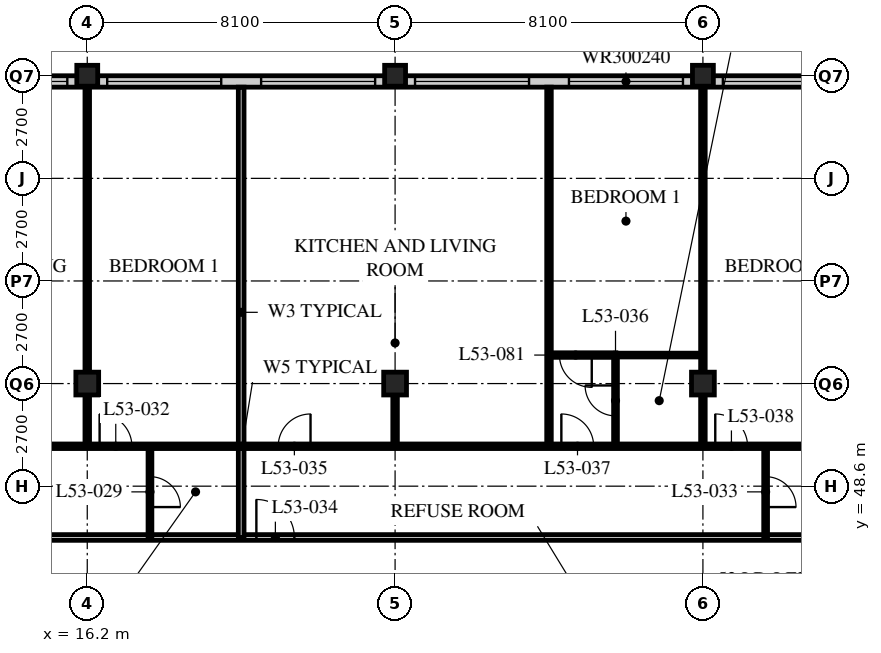
"""IFC4 building model, lengths in metres.
Left out: names, types, materials, properties, quantities, classifications, styles, units other than length and angle.
Written with IfcOpenShell. Run it as: python <this file> out.ifc"""

import sys

from ifc_helpers import new_model, si_unit, direction, frame, frame_2d, origin, origin_2d, place, context, subcontext, project, spatial, rectangle, hollow_rectangle, extrude, element, fill, save


model = new_model("IFC4")
c1 = context("Model", 3, precision=1e-05, world=origin(), true_north=direction((0.0, 1.0)))
c2 = subcontext(c1, "Body", "Model", "MODEL_VIEW")
j1 = project(units=[si_unit("LENGTHUNIT", "METRE"), si_unit("PLANEANGLEUNIT", "RADIAN")], contexts=[c1])
p1 = place(None, origin())
s1 = spatial("IfcSite", under=j1, at=p1, CompositionType="ELEMENT")
p2 = place(p1, origin())
s2 = spatial("IfcBuilding", under=s1, at=p2, CompositionType="ELEMENT")
p3 = place(p2, frame((0.0, 0.0, 206.4)))
s3 = spatial("IfcBuildingStorey", under=s2, at=p3, CompositionType="ELEMENT", Elevation=206.4)
p4 = place(p3, frame((16.2, 51.3, 0.0), z_axis=(0.0, 0.0, 1.0), x_axis=(1.0, 0.0, 0.0)))
e1 = element("IfcColumn", 1, at=p4, inside=s3, PredefinedType="COLUMN", context=c2, shape_type="SweptSolid", body=[
    extrude(hollow_rectangle(XDim=0.6, YDim=0.6, WallThickness=0.05, at=origin_2d()), origin(), (0.0, 0.0, 1.0), 3.6),
])
p5 = place(p3, frame((16.2, 59.4, 0.0), z_axis=(0.0, 0.0, 1.0), x_axis=(1.0, 0.0, 0.0)))
e2 = element("IfcColumn", 2, at=p5, inside=s3, PredefinedType="COLUMN", context=c2, shape_type="SweptSolid", body=[
    extrude(hollow_rectangle(XDim=0.55, YDim=0.55, WallThickness=0.045, at=origin_2d()), origin(), (0.0, 0.0, 1.0), 3.6),
])
p6 = place(p3, frame((24.3, 51.3, 0.0), z_axis=(0.0, 0.0, 1.0), x_axis=(1.0, 0.0, 0.0)))
e3 = element("IfcColumn", 3, at=p6, inside=s3, PredefinedType="COLUMN", context=c2, shape_type="SweptSolid", body=[
    extrude(hollow_rectangle(XDim=0.6, YDim=0.6, WallThickness=0.05, at=origin_2d()), origin(), (0.0, 0.0, 1.0), 3.6),
])
p7 = place(p3, frame((24.3, 59.4, 0.0), z_axis=(0.0, 0.0, 1.0), x_axis=(1.0, 0.0, 0.0)))
e4 = element("IfcColumn", 4, at=p7, inside=s3, PredefinedType="COLUMN", context=c2, shape_type="SweptSolid", body=[
    extrude(hollow_rectangle(XDim=0.55, YDim=0.55, WallThickness=0.045, at=origin_2d()), origin(), (0.0, 0.0, 1.0), 3.6),
])
p8 = place(p3, frame((32.4, 51.3, 0.0), z_axis=(0.0, 0.0, 1.0), x_axis=(1.0, 0.0, 0.0)))
e5 = element("IfcColumn", 5, at=p8, inside=s3, PredefinedType="COLUMN", context=c2, shape_type="SweptSolid", body=[
    extrude(hollow_rectangle(XDim=0.6, YDim=0.6, WallThickness=0.05, at=origin_2d()), origin(), (0.0, 0.0, 1.0), 3.6),
])
p9 = place(p3, frame((32.4, 59.4, 0.0), z_axis=(0.0, 0.0, 1.0), x_axis=(1.0, 0.0, 0.0)))
e6 = element("IfcColumn", 6, at=p9, inside=s3, PredefinedType="COLUMN", context=c2, shape_type="SweptSolid", body=[
    extrude(hollow_rectangle(XDim=0.55, YDim=0.55, WallThickness=0.045, at=origin_2d()), origin(), (0.0, 0.0, 1.0), 3.6),
])
p10 = place(p3, frame((48.3, 59.25, 0.0), z_axis=(0.0, 0.0, 1.0), x_axis=(-1.0, 0.0, 0.0)))
e7 = element("IfcWall", 7, at=p10, inside=s3, PredefinedType="SOLIDWALL", context=c2, shape_type="SweptSolid", body=[
    extrude(rectangle(XDim=40.2, YDim=0.3, at=frame_2d((20.1, 0.0))), origin(), (0.0, 0.0, 1.0), 3.39),
])
p11 = place(p10, frame((0.225, 0.0, 0.6)))
e8 = element("IfcOpeningElement", 8, at=p11, cuts=e7, PredefinedType="OPENING", context=c2, shape_type="SweptSolid", body=[
    extrude(rectangle(XDim=3.0, YDim=2.4, at=frame_2d((1.5, 1.2))), frame((0.0, 0.16, 0.0), z_axis=(0.0, -1.0, 0.0), x_axis=(1.0, 0.0, 0.0)), (0.0, 0.0, 1.0), 0.32),
])
p12 = place(p10, frame((4.275, 0.0, 0.6)))
e9 = element("IfcOpeningElement", 9, at=p12, cuts=e7, PredefinedType="OPENING", context=c2, shape_type="SweptSolid", body=[
    extrude(rectangle(XDim=3.0, YDim=2.4, at=frame_2d((1.5, 1.2))), frame((0.0, 0.16, 0.0), z_axis=(0.0, -1.0, 0.0), x_axis=(1.0, 0.0, 0.0)), (0.0, 0.0, 1.0), 0.32),
])
p13 = place(p10, frame((8.325, 0.0, 0.6)))
e10 = element("IfcOpeningElement", 10, at=p13, cuts=e7, PredefinedType="OPENING", context=c2, shape_type="SweptSolid", body=[
    extrude(rectangle(XDim=3.0, YDim=2.4, at=frame_2d((1.5, 1.2))), frame((0.0, 0.16, 0.0), z_axis=(0.0, -1.0, 0.0), x_axis=(1.0, 0.0, 0.0)), (0.0, 0.0, 1.0), 0.32),
])
p14 = place(p10, frame((12.375, 0.0, 0.6)))
e11 = element("IfcOpeningElement", 11, at=p14, cuts=e7, PredefinedType="OPENING", context=c2, shape_type="SweptSolid", body=[
    extrude(rectangle(XDim=3.0, YDim=2.4, at=frame_2d((1.5, 1.2))), frame((0.0, 0.16, 0.0), z_axis=(0.0, -1.0, 0.0), x_axis=(1.0, 0.0, 0.0)), (0.0, 0.0, 1.0), 0.32),
])
p15 = place(p10, frame((16.425, 0.0, 0.6)))
e12 = element("IfcOpeningElement", 12, at=p15, cuts=e7, PredefinedType="OPENING", context=c2, shape_type="SweptSolid", body=[
    extrude(rectangle(XDim=3.0, YDim=2.4, at=frame_2d((1.5, 1.2))), frame((0.0, 0.16, 0.0), z_axis=(0.0, -1.0, 0.0), x_axis=(1.0, 0.0, 0.0)), (0.0, 0.0, 1.0), 0.32),
])
p16 = place(p10, frame((20.475, 0.0, 0.6)))
e13 = element("IfcOpeningElement", 13, at=p16, cuts=e7, PredefinedType="OPENING", context=c2, shape_type="SweptSolid", body=[
    extrude(rectangle(XDim=3.0, YDim=2.4, at=frame_2d((1.5, 1.2))), frame((0.0, 0.16, 0.0), z_axis=(0.0, -1.0, 0.0), x_axis=(1.0, 0.0, 0.0)), (0.0, 0.0, 1.0), 0.32),
])
p17 = place(p10, frame((24.525, 0.0, 0.6)))
e14 = element("IfcOpeningElement", 14, at=p17, cuts=e7, PredefinedType="OPENING", context=c2, shape_type="SweptSolid", body=[
    extrude(rectangle(XDim=3.0, YDim=2.4, at=frame_2d((1.5, 1.2))), frame((0.0, 0.16, 0.0), z_axis=(0.0, -1.0, 0.0), x_axis=(1.0, 0.0, 0.0)), (0.0, 0.0, 1.0), 0.32),
])
p18 = place(p10, frame((28.575, 0.0, 0.6)))
e15 = element("IfcOpeningElement", 15, at=p18, cuts=e7, PredefinedType="OPENING", context=c2, shape_type="SweptSolid", body=[
    extrude(rectangle(XDim=3.0, YDim=2.4, at=frame_2d((1.5, 1.2))), frame((0.0, 0.16, 0.0), z_axis=(0.0, -1.0, 0.0), x_axis=(1.0, 0.0, 0.0)), (0.0, 0.0, 1.0), 0.32),
])
p19 = place(p10, frame((32.625, 0.0, 0.6)))
e16 = element("IfcOpeningElement", 16, at=p19, cuts=e7, PredefinedType="OPENING", context=c2, shape_type="SweptSolid", body=[
    extrude(rectangle(XDim=3.0, YDim=2.4, at=frame_2d((1.5, 1.2))), frame((0.0, 0.16, 0.0), z_axis=(0.0, -1.0, 0.0), x_axis=(1.0, 0.0, 0.0)), (0.0, 0.0, 1.0), 0.32),
])
p20 = place(p10, frame((36.675, 0.0, 0.6)))
e17 = element("IfcOpeningElement", 17, at=p20, cuts=e7, PredefinedType="OPENING", context=c2, shape_type="SweptSolid", body=[
    extrude(rectangle(XDim=3.0, YDim=2.4, at=frame_2d((1.5, 1.2))), frame((0.0, 0.16, 0.0), z_axis=(0.0, -1.0, 0.0), x_axis=(1.0, 0.0, 0.0)), (0.0, 0.0, 1.0), 0.32),
])
p21 = place(p3, frame((8.1, 47.25, 0.0), z_axis=(0.0, 0.0, 1.0), x_axis=(1.0, 0.0, 0.0)))
e18 = element("IfcWall", 18, at=p21, inside=s3, PredefinedType="PARTITIONING", context=c2, shape_type="SweptSolid", body=[
    extrude(rectangle(XDim=36.45, YDim=0.15, at=frame_2d((18.225, 0.0))), origin(), (0.0, 0.0, 1.0), 3.39),
])
p22 = place(p21, frame((4.45, 0.0, 0.0)))
e19 = element("IfcOpeningElement", 19, at=p22, cuts=e18, PredefinedType="OPENING", context=c2, shape_type="SweptSolid", body=[
    extrude(rectangle(XDim=1.0, YDim=2.1, at=frame_2d((0.5, 1.05))), frame((0.0, 0.085, 0.0), z_axis=(0.0, -1.0, 0.0), x_axis=(1.0, 0.0, 0.0)), (0.0, 0.0, 1.0), 0.17),
])
p23 = place(p21, frame((12.55, 0.0, 0.0)))
e20 = element("IfcOpeningElement", 20, at=p23, cuts=e18, PredefinedType="OPENING", context=c2, shape_type="SweptSolid", body=[
    extrude(rectangle(XDim=1.0, YDim=2.1, at=frame_2d((0.5, 1.05))), frame((0.0, 0.085, 0.0), z_axis=(0.0, -1.0, 0.0), x_axis=(1.0, 0.0, 0.0)), (0.0, 0.0, 1.0), 0.17),
])
p24 = place(p21, frame((30.7, 0.0, 0.0)))
e21 = element("IfcOpeningElement", 21, at=p24, cuts=e18, PredefinedType="OPENING", context=c2, shape_type="SweptSolid", body=[
    extrude(rectangle(XDim=1.0, YDim=2.1, at=frame_2d((0.5, 1.05))), frame((0.0, 0.085, 0.0), z_axis=(0.0, -1.0, 0.0), x_axis=(1.0, 0.0, 0.0)), (0.0, 0.0, 1.0), 0.17),
])
p25 = place(p21, frame((33.925, 0.0, 0.0)))
e22 = element("IfcOpeningElement", 22, at=p25, cuts=e18, PredefinedType="OPENING", context=c2, shape_type="SweptSolid", body=[
    extrude(rectangle(XDim=1.0, YDim=2.1, at=frame_2d((0.5, 1.05))), frame((0.0, 0.085, 0.0), z_axis=(0.0, -1.0, 0.0), x_axis=(1.0, 0.0, 0.0)), (0.0, 0.0, 1.0), 0.17),
])
p26 = place(p21, frame((1.525, 0.0, 0.0)))
e23 = element("IfcOpeningElement", 23, at=p26, cuts=e18, PredefinedType="OPENING", context=c2, shape_type="SweptSolid", body=[
    extrude(rectangle(XDim=1.0, YDim=2.1, at=frame_2d((0.5, 1.05))), frame((0.0, 0.085, 0.0), z_axis=(0.0, -1.0, 0.0), x_axis=(1.0, 0.0, 0.0)), (0.0, 0.0, 1.0), 0.17),
])
p27 = place(p3, frame((17.85, 47.25, 0.0), z_axis=(0.0, 0.0, 1.0), x_axis=(0.0, 1.0, 0.0)))
e24 = element("IfcWall", 24, at=p27, inside=s3, PredefinedType="PARTITIONING", context=c2, shape_type="SweptSolid", body=[
    extrude(rectangle(XDim=2.4, YDim=0.1, at=frame_2d((1.2, 0.0))), origin(), (0.0, 0.0, 1.0), 3.39),
])
p28 = place(p27, frame((0.8, 0.0, 0.0)))
e25 = element("IfcOpeningElement", 25, at=p28, cuts=e24, PredefinedType="OPENING", context=c2, shape_type="SweptSolid", body=[
    extrude(rectangle(XDim=0.8, YDim=2.1, at=frame_2d((0.4, 1.05))), frame((0.0, 0.06, 0.0), z_axis=(0.0, -1.0, 0.0), x_axis=(1.0, 0.0, 0.0)), (0.0, 0.0, 1.0), 0.12),
])
p29 = place(p3, frame((16.2, 49.65, 0.0), z_axis=(0.0, 0.0, 1.0), x_axis=(0.0, 1.0, 0.0)))
e26 = element("IfcWall", 26, at=p29, inside=s3, PredefinedType="PARTITIONING", context=c2, shape_type="SweptSolid", body=[
    extrude(rectangle(XDim=9.45, YDim=0.12, at=frame_2d((4.725, 0.0))), origin(), (0.0, 0.0, 1.0), 2.778),
])
p30 = place(p3, frame((20.25, 47.25, 0.0), z_axis=(0.0, 0.0, 1.0), x_axis=(0.0, 1.0, 0.0)))
e27 = element("IfcWall", 27, at=p30, inside=s3, PredefinedType="PARTITIONING", context=c2, shape_type="SweptSolid", body=[
    extrude(rectangle(XDim=11.85, YDim=0.15, at=frame_2d((5.925, 0.0))), origin(), (0.0, 0.0, 1.0), 3.39),
])
p31 = place(p3, frame((34.05, 47.25, 0.0), z_axis=(0.0, 0.0, 1.0), x_axis=(0.0, 1.0, 0.0)))
e28 = element("IfcWall", 28, at=p31, inside=s3, PredefinedType="PARTITIONING", context=c2, shape_type="SweptSolid", body=[
    extrude(rectangle(XDim=2.4, YDim=0.1, at=frame_2d((1.2, 0.0))), origin(), (0.0, 0.0, 1.0), 3.39),
])
p32 = place(p31, frame((0.8, 0.0, 0.0)))
e29 = element("IfcOpeningElement", 29, at=p32, cuts=e28, PredefinedType="OPENING", context=c2, shape_type="SweptSolid", body=[
    extrude(rectangle(XDim=0.8, YDim=2.1, at=frame_2d((0.4, 1.05))), frame((0.0, 0.06, 0.0), z_axis=(0.0, -1.0, 0.0), x_axis=(1.0, 0.0, 0.0)), (0.0, 0.0, 1.0), 0.12),
])
p33 = place(p3, frame((30.1, 49.65, 0.0), z_axis=(0.0, 0.0, 1.0), x_axis=(0.0, 1.0, 0.0)))
e30 = element("IfcWall", 30, at=p33, inside=s3, PredefinedType="PARTITIONING", context=c2, shape_type="SweptSolid", body=[
    extrude(rectangle(XDim=2.4, YDim=0.1, at=frame_2d((1.2, 0.0))), origin(), (0.0, 0.0, 1.0), 3.39),
])
p34 = place(p33, frame((0.8, 0.0, 0.0)))
e31 = element("IfcOpeningElement", 31, at=p34, cuts=e30, PredefinedType="OPENING", context=c2, shape_type="SweptSolid", body=[
    extrude(rectangle(XDim=0.8, YDim=2.1, at=frame_2d((0.4, 1.05))), frame((0.0, 0.06, 0.0), z_axis=(0.0, -1.0, 0.0), x_axis=(1.0, 0.0, 0.0)), (0.0, 0.0, 1.0), 0.12),
])
p35 = place(p3, frame((30.1, 52.05, 0.0), z_axis=(0.0, 0.0, 1.0), x_axis=(1.0, 0.0, 0.0)))
e32 = element("IfcWall", 32, at=p35, inside=s3, PredefinedType="PARTITIONING", context=c2, shape_type="SweptSolid", body=[
    extrude(rectangle(XDim=2.3, YDim=0.1, at=frame_2d((1.15, 0.0))), origin(), (0.0, 0.0, 1.0), 3.39),
])
p36 = place(p3, frame((28.35, 49.65, 0.0), z_axis=(0.0, 0.0, 1.0), x_axis=(0.0, 1.0, 0.0)))
e33 = element("IfcWall", 33, at=p36, inside=s3, PredefinedType="PARTITIONING", context=c2, shape_type="SweptSolid", body=[
    extrude(rectangle(XDim=9.45, YDim=0.12, at=frame_2d((4.725, 0.0))), origin(), (0.0, 0.0, 1.0), 3.39),
])
p37 = place(p3, frame((32.4, 49.65, 0.0), z_axis=(0.0, 0.0, 1.0), x_axis=(0.0, 1.0, 0.0)))
e34 = element("IfcWall", 34, at=p37, inside=s3, PredefinedType="PARTITIONING", context=c2, shape_type="SweptSolid", body=[
    extrude(rectangle(XDim=9.45, YDim=0.12, at=frame_2d((4.725, 0.0))), origin(), (0.0, 0.0, 1.0), 2.778),
])
p38 = place(p3, frame((4.1, 49.65, 0.0), z_axis=(0.0, 0.0, 1.0), x_axis=(1.0, 0.0, 0.0)))
e35 = element("IfcWall", 35, at=p38, inside=s3, PredefinedType="PARTITIONING", context=c2, shape_type="SweptSolid", body=[
    extrude(rectangle(XDim=32.35, YDim=0.12, at=frame_2d((16.175, 0.0))), origin(), (0.0, 0.0, 1.0), 3.39),
])
p39 = place(p38, frame((9.025, 0.0, 0.0)))
e36 = element("IfcOpeningElement", 36, at=p39, cuts=e35, PredefinedType="OPENING", context=c2, shape_type="SweptSolid", body=[
    extrude(rectangle(XDim=0.85, YDim=2.1, at=frame_2d((0.425, 1.05))), frame((0.0, 0.07, 0.0), z_axis=(0.0, -1.0, 0.0), x_axis=(1.0, 0.0, 0.0)), (0.0, 0.0, 1.0), 0.14),
])
p40 = place(p38, frame((12.425, 0.0, 0.0)))
e37 = element("IfcOpeningElement", 37, at=p40, cuts=e35, PredefinedType="OPENING", context=c2, shape_type="SweptSolid", body=[
    extrude(rectangle(XDim=0.85, YDim=2.1, at=frame_2d((0.425, 1.05))), frame((0.0, 0.07, 0.0), z_axis=(0.0, -1.0, 0.0), x_axis=(1.0, 0.0, 0.0)), (0.0, 0.0, 1.0), 0.14),
])
p41 = place(p38, frame((17.125, 0.0, 0.0)))
e38 = element("IfcOpeningElement", 38, at=p41, cuts=e35, PredefinedType="OPENING", context=c2, shape_type="SweptSolid", body=[
    extrude(rectangle(XDim=0.85, YDim=2.1, at=frame_2d((0.425, 1.05))), frame((0.0, 0.07, 0.0), z_axis=(0.0, -1.0, 0.0), x_axis=(1.0, 0.0, 0.0)), (0.0, 0.0, 1.0), 0.14),
])
p42 = place(p38, frame((24.575, 0.0, 0.0)))
e39 = element("IfcOpeningElement", 39, at=p42, cuts=e35, PredefinedType="OPENING", context=c2, shape_type="SweptSolid", body=[
    extrude(rectangle(XDim=0.85, YDim=2.1, at=frame_2d((0.425, 1.05))), frame((0.0, 0.07, 0.0), z_axis=(0.0, -1.0, 0.0), x_axis=(1.0, 0.0, 0.0)), (0.0, 0.0, 1.0), 0.14),
])
p43 = place(p38, frame((28.625, 0.0, 0.0)))
e40 = element("IfcOpeningElement", 40, at=p43, cuts=e35, PredefinedType="OPENING", context=c2, shape_type="SweptSolid", body=[
    extrude(rectangle(XDim=0.85, YDim=2.1, at=frame_2d((0.425, 1.05))), frame((0.0, 0.07, 0.0), z_axis=(0.0, -1.0, 0.0), x_axis=(1.0, 0.0, 0.0)), (0.0, 0.0, 1.0), 0.14),
])
p44 = place(p38, frame((6.725, 0.0, 0.0)))
e41 = element("IfcOpeningElement", 41, at=p44, cuts=e35, PredefinedType="OPENING", context=c2, shape_type="SweptSolid", body=[
    extrude(rectangle(XDim=0.85, YDim=2.1, at=frame_2d((0.425, 1.05))), frame((0.0, 0.07, 0.0), z_axis=(0.0, -1.0, 0.0), x_axis=(1.0, 0.0, 0.0)), (0.0, 0.0, 1.0), 0.14),
])
p45 = place(p38, frame((2.875, 0.0, 0.0)))
e42 = element("IfcOpeningElement", 42, at=p45, cuts=e35, PredefinedType="OPENING", context=c2, shape_type="SweptSolid", body=[
    extrude(rectangle(XDim=0.85, YDim=2.1, at=frame_2d((0.425, 1.05))), frame((0.0, 0.07, 0.0), z_axis=(0.0, -1.0, 0.0), x_axis=(1.0, 0.0, 0.0)), (0.0, 0.0, 1.0), 0.14),
])
p46 = place(p3, frame((28.35, 52.05, 0.0), z_axis=(0.0, 0.0, 1.0), x_axis=(1.0, 0.0, 0.0)))
e43 = element("IfcWall", 43, at=p46, inside=s3, PredefinedType="PARTITIONING", context=c2, shape_type="SweptSolid", body=[
    extrude(rectangle(XDim=1.76, YDim=0.12, at=frame_2d((0.88, 0.0))), origin(), (0.0, 0.0, 1.0), 3.39),
])
p47 = place(p46, frame((0.275, 0.0, 0.0)))
e44 = element("IfcOpeningElement", 44, at=p47, cuts=e43, PredefinedType="OPENING", context=c2, shape_type="SweptSolid", body=[
    extrude(rectangle(XDim=0.85, YDim=2.1, at=frame_2d((0.425, 1.05))), frame((0.0, 0.07, 0.0), z_axis=(0.0, -1.0, 0.0), x_axis=(1.0, 0.0, 0.0)), (0.0, 0.0, 1.0), 0.14),
])
p48 = place(p3, frame((24.3, 49.65, 0.0), z_axis=(0.0, 0.0, 1.0), x_axis=(0.0, 1.0, 0.0)))
e45 = element("IfcWall", 45, at=p48, inside=s3, PredefinedType="PARTITIONING", context=c2, shape_type="SweptSolid", body=[
    extrude(rectangle(XDim=1.35, YDim=0.12, at=frame_2d((0.675, 0.0))), origin(), (0.0, 0.0, 1.0), 2.778),
])
p49 = place(p14, origin())
e46 = element("IfcWindow", 46, at=p49, inside=s3, PartitioningType="SINGLE_PANEL", PredefinedType="WINDOW", context=c2, shape_type="SweptSolid", body=[
    extrude(rectangle(XDim=3.0, YDim=2.4, at=frame_2d((1.5, 1.2))), frame((0.0, 0.03, 0.0), z_axis=(0.0, -1.0, 0.0), x_axis=(1.0, 0.0, 0.0)), (0.0, 0.0, 1.0), 0.06),
])
fill(e11, e46)
p50 = place(p15, origin())
e47 = element("IfcWindow", 47, at=p50, inside=s3, PartitioningType="SINGLE_PANEL", PredefinedType="WINDOW", context=c2, shape_type="SweptSolid", body=[
    extrude(rectangle(XDim=3.0, YDim=2.4, at=frame_2d((1.5, 1.2))), frame((0.0, 0.03, 0.0), z_axis=(0.0, -1.0, 0.0), x_axis=(1.0, 0.0, 0.0)), (0.0, 0.0, 1.0), 0.06),
])
fill(e12, e47)
p51 = place(p16, origin())
e48 = element("IfcWindow", 48, at=p51, inside=s3, PartitioningType="SINGLE_PANEL", PredefinedType="WINDOW", context=c2, shape_type="SweptSolid", body=[
    extrude(rectangle(XDim=3.0, YDim=2.4, at=frame_2d((1.5, 1.2))), frame((0.0, 0.03, 0.0), z_axis=(0.0, -1.0, 0.0), x_axis=(1.0, 0.0, 0.0)), (0.0, 0.0, 1.0), 0.06),
])
fill(e13, e48)
p52 = place(p17, origin())
e49 = element("IfcWindow", 49, at=p52, inside=s3, PartitioningType="SINGLE_PANEL", PredefinedType="WINDOW", context=c2, shape_type="SweptSolid", body=[
    extrude(rectangle(XDim=3.0, YDim=2.4, at=frame_2d((1.5, 1.2))), frame((0.0, 0.03, 0.0), z_axis=(0.0, -1.0, 0.0), x_axis=(1.0, 0.0, 0.0)), (0.0, 0.0, 1.0), 0.06),
])
fill(e14, e49)
p53 = place(p18, origin())
e50 = element("IfcWindow", 50, at=p53, inside=s3, PartitioningType="SINGLE_PANEL", PredefinedType="WINDOW", context=c2, shape_type="SweptSolid", body=[
    extrude(rectangle(XDim=3.0, YDim=2.4, at=frame_2d((1.5, 1.2))), frame((0.0, 0.03, 0.0), z_axis=(0.0, -1.0, 0.0), x_axis=(1.0, 0.0, 0.0)), (0.0, 0.0, 1.0), 0.06),
])
fill(e15, e50)
p54 = place(p19, origin())
e51 = element("IfcWindow", 51, at=p54, inside=s3, PartitioningType="SINGLE_PANEL", PredefinedType="WINDOW", context=c2, shape_type="SweptSolid", body=[
    extrude(rectangle(XDim=3.0, YDim=2.4, at=frame_2d((1.5, 1.2))), frame((0.0, 0.03, 0.0), z_axis=(0.0, -1.0, 0.0), x_axis=(1.0, 0.0, 0.0)), (0.0, 0.0, 1.0), 0.06),
])
fill(e16, e51)
p55 = place(p28, origin())
e52 = element("IfcDoor", 52, at=p55, inside=s3, OperationType="SINGLE_SWING_RIGHT", PredefinedType="DOOR", context=c2, shape_type="SweptSolid", body=[
    extrude(rectangle(XDim=0.8, YDim=2.1, at=frame_2d((0.4, 1.05))), frame((0.0, 0.025, 0.0), z_axis=(0.0, -1.0, 0.0), x_axis=(1.0, 0.0, 0.0)), (0.0, 0.0, 1.0), 0.05),
])
fill(e25, e52)
p56 = place(p40, origin())
e53 = element("IfcDoor", 53, at=p56, inside=s3, OperationType="SINGLE_SWING_LEFT", PredefinedType="DOOR", context=c2, shape_type="SweptSolid", body=[
    extrude(rectangle(XDim=0.85, YDim=2.1, at=frame_2d((0.425, 1.05))), frame((0.0, 0.025, 0.0), z_axis=(0.0, -1.0, 0.0), x_axis=(1.0, 0.0, 0.0)), (0.0, 0.0, 1.0), 0.05),
])
fill(e37, e53)
p57 = place(p32, origin())
e54 = element("IfcDoor", 54, at=p57, inside=s3, OperationType="SINGLE_SWING_RIGHT", PredefinedType="DOOR", context=c2, shape_type="SweptSolid", body=[
    extrude(rectangle(XDim=0.8, YDim=2.1, at=frame_2d((0.4, 1.05))), frame((0.0, 0.025, 0.0), z_axis=(0.0, -1.0, 0.0), x_axis=(1.0, 0.0, 0.0)), (0.0, 0.0, 1.0), 0.05),
])
fill(e29, e54)
p58 = place(p23, origin())
e55 = element("IfcDoor", 55, at=p58, inside=s3, OperationType="SINGLE_SWING_LEFT", PredefinedType="DOOR", context=c2, shape_type="SweptSolid", body=[
    extrude(rectangle(XDim=1.0, YDim=2.1, at=frame_2d((0.5, 1.05))), frame((0.0, 0.025, 0.0), z_axis=(0.0, -1.0, 0.0), x_axis=(1.0, 0.0, 0.0)), (0.0, 0.0, 1.0), 0.05),
])
fill(e20, e55)
p59 = place(p41, origin())
e56 = element("IfcDoor", 56, at=p59, inside=s3, OperationType="SINGLE_SWING_RIGHT", PredefinedType="DOOR", context=c2, shape_type="SweptSolid", body=[
    extrude(rectangle(XDim=0.85, YDim=2.1, at=frame_2d((0.425, 1.05))), frame((0.0, 0.025, 0.0), z_axis=(0.0, -1.0, 0.0), x_axis=(1.0, 0.0, 0.0)), (0.0, 0.0, 1.0), 0.05),
])
fill(e38, e56)
p60 = place(p34, origin())
e57 = element("IfcDoor", 57, at=p60, inside=s3, OperationType="SINGLE_SWING_RIGHT", PredefinedType="DOOR", context=c2, shape_type="SweptSolid", body=[
    extrude(rectangle(XDim=0.8, YDim=2.1, at=frame_2d((0.4, 1.05))), frame((0.0, 0.025, 0.0), z_axis=(0.0, -1.0, 0.0), x_axis=(1.0, 0.0, 0.0)), (0.0, 0.0, 1.0), 0.05),
])
fill(e31, e57)
p61 = place(p42, origin())
e58 = element("IfcDoor", 58, at=p61, inside=s3, OperationType="SINGLE_SWING_LEFT", PredefinedType="DOOR", context=c2, shape_type="SweptSolid", body=[
    extrude(rectangle(XDim=0.85, YDim=2.1, at=frame_2d((0.425, 1.05))), frame((0.0, 0.025, 0.0), z_axis=(0.0, -1.0, 0.0), x_axis=(1.0, 0.0, 0.0)), (0.0, 0.0, 1.0), 0.05),
])
fill(e39, e58)
p62 = place(p43, origin())
e59 = element("IfcDoor", 59, at=p62, inside=s3, OperationType="SINGLE_SWING_LEFT", PredefinedType="DOOR", context=c2, shape_type="SweptSolid", body=[
    extrude(rectangle(XDim=0.85, YDim=2.1, at=frame_2d((0.425, 1.05))), frame((0.0, 0.025, 0.0), z_axis=(0.0, -1.0, 0.0), x_axis=(1.0, 0.0, 0.0)), (0.0, 0.0, 1.0), 0.05),
])
fill(e40, e59)
p63 = place(p47, origin())
e60 = element("IfcDoor", 60, at=p63, inside=s3, OperationType="SINGLE_SWING_LEFT", PredefinedType="DOOR", context=c2, shape_type="SweptSolid", body=[
    extrude(rectangle(XDim=0.85, YDim=2.1, at=frame_2d((0.425, 1.05))), frame((0.0, 0.025, 0.0), z_axis=(0.0, -1.0, 0.0), x_axis=(1.0, 0.0, 0.0)), (0.0, 0.0, 1.0), 0.05),
])
fill(e44, e60)
save(model, sys.argv[1])
